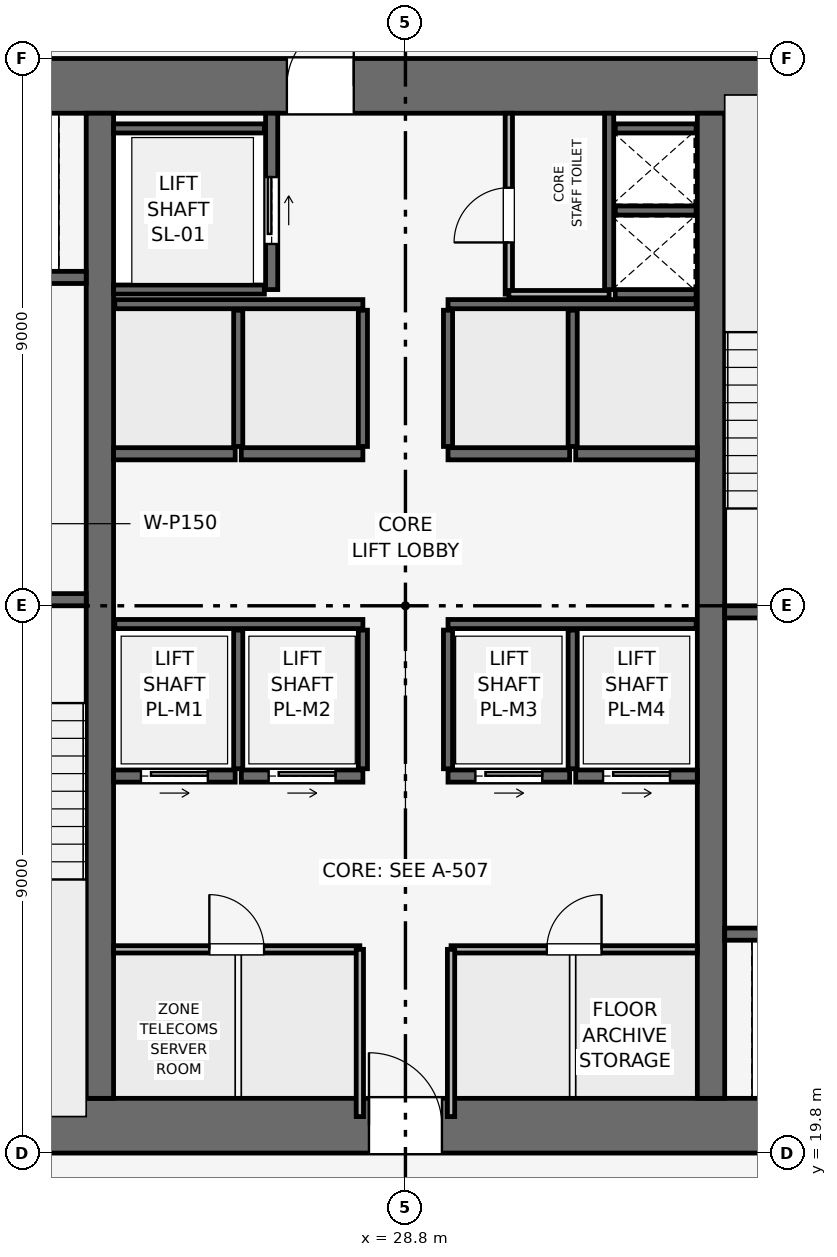
"""IFC4 building model, lengths in metres.
Left out: names, types, materials, properties, quantities, classifications, styles, units other than length and angle.
Written with IfcOpenShell. Run it as: python <this file> out.ifc"""

import sys

from ifc_helpers import new_model, si_unit, direction, frame, frame_2d, origin, place, context, subcontext, project, spatial, rectangle, extrude, element, fill, save


model = new_model("IFC4")
c1 = context("Model", 3, precision=1e-05, world=origin(), true_north=direction((0.0, 1.0)))
c2 = subcontext(c1, "Body", "Model", "MODEL_VIEW")
j1 = project(units=[si_unit("LENGTHUNIT", "METRE"), si_unit("PLANEANGLEUNIT", "RADIAN")], contexts=[c1])
p1 = place(None, origin())
s1 = spatial("IfcSite", under=j1, at=p1, CompositionType="ELEMENT")
p2 = place(p1, origin())
s2 = spatial("IfcBuilding", under=s1, at=p2, CompositionType="ELEMENT")
p3 = place(p2, frame((0.0, 0.0, 149.55)))
s3 = spatial("IfcBuildingStorey", under=s2, at=p3, CompositionType="ELEMENT", Elevation=149.55)
p4 = place(p3, frame((19.8, 20.25, 0.0), z_axis=(0.0, 0.0, 1.0), x_axis=(1.0, 0.0, 0.0)))
e1 = element("IfcWall", 1, at=p4, inside=s3, PredefinedType="SHEAR", context=c2, shape_type="SweptSolid", body=[
    extrude(rectangle(XDim=18.0, YDim=0.9, at=frame_2d((9.0, 0.0))), origin(), (0.0, 0.0, 1.0), 3.75),
])
p5 = place(p4, frame((8.4, 0.0, 0.0)))
e2 = element("IfcOpeningElement", 2, at=p5, cuts=e1, PredefinedType="OPENING", context=c2, shape_type="SweptSolid", body=[
    extrude(rectangle(XDim=1.2, YDim=2.2, at=frame_2d((0.6, 1.1))), frame((0.0, 0.46, 0.0), z_axis=(0.0, -1.0, 0.0), x_axis=(1.0, 0.0, 0.0)), (0.0, 0.0, 1.0), 0.92),
])
p6 = place(p3, frame((19.8, 37.35, 0.0), z_axis=(0.0, 0.0, 1.0), x_axis=(1.0, 0.0, 0.0)))
e3 = element("IfcWall", 3, at=p6, inside=s3, PredefinedType="SHEAR", context=c2, shape_type="SweptSolid", body=[
    extrude(rectangle(XDim=18.0, YDim=0.9, at=frame_2d((9.0, 0.0))), origin(), (0.0, 0.0, 1.0), 3.75),
])
p7 = place(p6, frame((7.05, 0.0, 0.0)))
e4 = element("IfcOpeningElement", 4, at=p7, cuts=e3, PredefinedType="OPENING", context=c2, shape_type="SweptSolid", body=[
    extrude(rectangle(XDim=1.1, YDim=2.15, at=frame_2d((0.55, 1.075))), frame((0.0, 0.46, 0.0), z_axis=(0.0, -1.0, 0.0), x_axis=(1.0, 0.0, 0.0)), (0.0, 0.0, 1.0), 0.92),
])
for number, where, z_axis, x_axis in (
    (5, (23.775, 20.7, 0.0), (0.0, 0.0, 1.0), (0.0, 1.0, 0.0)),
    (6, (33.825, 20.7, 0.0), (0.0, 0.0, 1.0), (0.0, 1.0, 0.0)),
):
    element("IfcWall", number, at=place(p3, frame(where, z_axis=z_axis, x_axis=x_axis)), inside=s3, PredefinedType="SHEAR", context=c2, shape_type="SweptSolid", body=[
        extrude(rectangle(XDim=16.2, YDim=0.45, at=frame_2d((8.1, 0.0))), origin(), (0.0, 0.0, 1.0), 3.75),
    ])
p8 = place(p3, frame((20.4, 28.9, 0.0), z_axis=(0.0, 0.0, 1.0), x_axis=(1.0, 0.0, 0.0)))
e7 = element("IfcWall", 7, at=p8, inside=s3, PredefinedType="SHEAR", context=c2, shape_type="SweptSolid", body=[
    extrude(rectangle(XDim=3.15, YDim=0.2, at=frame_2d((1.575, 0.0))), origin(), (0.0, 0.0, 1.0), 3.495),
])
p9 = place(p8, frame((0.8, 0.0, 0.0)))
e8 = element("IfcOpeningElement", 8, at=p9, cuts=e7, PredefinedType="OPENING", context=c2, shape_type="SweptSolid", body=[
    extrude(rectangle(XDim=1.0, YDim=2.1, at=frame_2d((0.5, 1.05))), frame((0.0, 0.11, 0.0), z_axis=(0.0, -1.0, 0.0), x_axis=(1.0, 0.0, 0.0)), (0.0, 0.0, 1.0), 0.22),
])
p10 = place(p3, frame((34.05, 28.7, 0.0), z_axis=(0.0, 0.0, 1.0), x_axis=(1.0, 0.0, 0.0)))
e9 = element("IfcWall", 9, at=p10, inside=s3, PredefinedType="SHEAR", context=c2, shape_type="SweptSolid", body=[
    extrude(rectangle(XDim=3.15, YDim=0.2, at=frame_2d((1.575, 0.0))), origin(), (0.0, 0.0, 1.0), 3.495),
])
p11 = place(p10, frame((0.8, 0.0, 0.0)))
e10 = element("IfcOpeningElement", 10, at=p11, cuts=e9, PredefinedType="OPENING", context=c2, shape_type="SweptSolid", body=[
    extrude(rectangle(XDim=1.0, YDim=2.1, at=frame_2d((0.5, 1.05))), frame((0.0, 0.11, 0.0), z_axis=(0.0, -1.0, 0.0), x_axis=(1.0, 0.0, 0.0)), (0.0, 0.0, 1.0), 0.22),
])
p12 = place(p3, frame((32.15, 34.0, 0.0), z_axis=(0.0, 0.0, 1.0), x_axis=(0.0, 1.0, 0.0)))
e11 = element("IfcWall", 11, at=p12, inside=s3, PredefinedType="SHEAR", context=c2, shape_type="SweptSolid", body=[
    extrude(rectangle(XDim=2.9, YDim=0.15, at=frame_2d((1.45, 0.0))), origin(), (0.0, 0.0, 1.0), 3.495),
])
for number, where, z_axis, x_axis in (
    (12, (32.25, 33.925, 0.0), (0.0, 0.0, 1.0), (1.0, 0.0, 0.0)),
    (13, (32.25, 35.3, 0.0), (0.0, 0.0, 1.0), (1.0, 0.0, 0.0)),
):
    element("IfcWall", number, at=place(p3, frame(where, z_axis=z_axis, x_axis=x_axis)), inside=s3, PredefinedType="SHEAR", context=c2, shape_type="SweptSolid", body=[
        extrude(rectangle(XDim=1.33, YDim=0.15, at=frame_2d((0.665, 0.0))), origin(), (0.0, 0.0, 1.0), 3.495),
    ])
p13 = place(p3, frame((20.5, 34.2, 0.0), z_axis=(0.0, 0.0, 1.0), x_axis=(1.0, 0.0, 0.0)))
e14 = element("IfcWall", 14, at=p13, inside=s3, PredefinedType="SHEAR", context=c2, shape_type="SweptSolid", body=[
    extrude(rectangle(XDim=3.05, YDim=0.2, at=frame_2d((1.525, 0.0))), origin(), (0.0, 0.0, 1.0), 3.495),
])
p14 = place(p13, frame((0.75, 0.0, 0.0)))
e15 = element("IfcOpeningElement", 15, at=p14, cuts=e14, PredefinedType="OPENING", context=c2, shape_type="SweptSolid", body=[
    extrude(rectangle(XDim=1.1, YDim=2.15, at=frame_2d((0.55, 1.075))), frame((0.0, 0.11, 0.0), z_axis=(0.0, -1.0, 0.0), x_axis=(1.0, 0.0, 0.0)), (0.0, 0.0, 1.0), 0.22),
])
p15 = place(p3, frame((34.05, 23.4, 0.0), z_axis=(0.0, 0.0, 1.0), x_axis=(1.0, 0.0, 0.0)))
e16 = element("IfcWall", 16, at=p15, inside=s3, PredefinedType="SHEAR", context=c2, shape_type="SweptSolid", body=[
    extrude(rectangle(XDim=3.05, YDim=0.2, at=frame_2d((1.525, 0.0))), origin(), (0.0, 0.0, 1.0), 3.495),
])
p16 = place(p15, frame((1.2, 0.0, 0.0)))
e17 = element("IfcOpeningElement", 17, at=p16, cuts=e16, PredefinedType="OPENING", context=c2, shape_type="SweptSolid", body=[
    extrude(rectangle(XDim=1.1, YDim=2.15, at=frame_2d((0.55, 1.075))), frame((0.0, 0.11, 0.0), z_axis=(0.0, -1.0, 0.0), x_axis=(1.0, 0.0, 0.0)), (0.0, 0.0, 1.0), 0.22),
])
p17 = place(p3, frame((26.6, 34.0, 0.0), z_axis=(0.0, 0.0, 1.0), x_axis=(0.0, 1.0, 0.0)))
e18 = element("IfcWall", 18, at=p17, inside=s3, PredefinedType="SHEAR", context=c2, shape_type="SweptSolid", body=[
    extrude(rectangle(XDim=2.9, YDim=0.2, at=frame_2d((1.45, 0.0))), origin(), (0.0, 0.0, 1.0), 3.495),
])
p18 = place(p17, frame((0.75, 0.0, 0.0)))
e19 = element("IfcOpeningElement", 19, at=p18, cuts=e18, PredefinedType="OPENING", context=c2, shape_type="SweptSolid", body=[
    extrude(rectangle(XDim=1.1, YDim=2.15, at=frame_2d((0.55, 1.075))), frame((0.0, 0.11, 0.0), z_axis=(0.0, -1.0, 0.0), x_axis=(1.0, 0.0, 0.0)), (0.0, 0.0, 1.0), 0.22),
])
for number, where, z_axis, x_axis in (
    (20, (24.0, 34.0, 0.0), (0.0, 0.0, 1.0), (1.0, 0.0, 0.0)),
    (21, (24.0, 36.65, 0.0), (0.0, 0.0, 1.0), (1.0, 0.0, 0.0)),
):
    element("IfcWall", number, at=place(p3, frame(where, z_axis=z_axis, x_axis=x_axis)), inside=s3, PredefinedType="SHEAR", context=c2, shape_type="SweptSolid", body=[
        extrude(rectangle(XDim=2.48, YDim=0.15, at=frame_2d((1.24, 0.0))), origin(), (0.0, 0.0, 1.0), 3.495),
    ])
p19 = place(p3, frame((24.0, 26.0, 0.0), z_axis=(0.0, 0.0, 1.0), x_axis=(1.0, 0.0, 0.0)))
e22 = element("IfcWall", 22, at=p19, inside=s3, PredefinedType="SHEAR", context=c2, shape_type="SweptSolid", body=[
    extrude(rectangle(XDim=2.0, YDim=0.2, at=frame_2d((1.0, 0.0))), origin(), (0.0, 0.0, 1.0), 3.495),
])
p20 = place(p19, frame((0.45, 0.0, 0.0)))
e23 = element("IfcOpeningElement", 23, at=p20, cuts=e22, PredefinedType="OPENING", context=c2, shape_type="SweptSolid", body=[
    extrude(rectangle(XDim=1.1, YDim=2.15, at=frame_2d((0.55, 1.075))), frame((0.0, 0.11, 0.0), z_axis=(0.0, -1.0, 0.0), x_axis=(1.0, 0.0, 0.0)), (0.0, 0.0, 1.0), 0.22),
])
p21 = place(p3, frame((26.1, 26.0, 0.0), z_axis=(0.0, 0.0, 1.0), x_axis=(1.0, 0.0, 0.0)))
e24 = element("IfcWall", 24, at=p21, inside=s3, PredefinedType="SHEAR", context=c2, shape_type="SweptSolid", body=[
    extrude(rectangle(XDim=2.0, YDim=0.2, at=frame_2d((1.0, 0.0))), origin(), (0.0, 0.0, 1.0), 3.495),
])
p22 = place(p21, frame((0.45, 0.0, 0.0)))
e25 = element("IfcOpeningElement", 25, at=p22, cuts=e24, PredefinedType="OPENING", context=c2, shape_type="SweptSolid", body=[
    extrude(rectangle(XDim=1.1, YDim=2.15, at=frame_2d((0.55, 1.075))), frame((0.0, 0.11, 0.0), z_axis=(0.0, -1.0, 0.0), x_axis=(1.0, 0.0, 0.0)), (0.0, 0.0, 1.0), 0.22),
])
p23 = place(p3, frame((29.5, 26.0, 0.0), z_axis=(0.0, 0.0, 1.0), x_axis=(1.0, 0.0, 0.0)))
e26 = element("IfcWall", 26, at=p23, inside=s3, PredefinedType="SHEAR", context=c2, shape_type="SweptSolid", body=[
    extrude(rectangle(XDim=2.0, YDim=0.2, at=frame_2d((1.0, 0.0))), origin(), (0.0, 0.0, 1.0), 3.495),
])
p24 = place(p23, frame((0.45, 0.0, 0.0)))
e27 = element("IfcOpeningElement", 27, at=p24, cuts=e26, PredefinedType="OPENING", context=c2, shape_type="SweptSolid", body=[
    extrude(rectangle(XDim=1.1, YDim=2.15, at=frame_2d((0.55, 1.075))), frame((0.0, 0.11, 0.0), z_axis=(0.0, -1.0, 0.0), x_axis=(1.0, 0.0, 0.0)), (0.0, 0.0, 1.0), 0.22),
])
p25 = place(p3, frame((31.6, 26.0, 0.0), z_axis=(0.0, 0.0, 1.0), x_axis=(1.0, 0.0, 0.0)))
e28 = element("IfcWall", 28, at=p25, inside=s3, PredefinedType="SHEAR", context=c2, shape_type="SweptSolid", body=[
    extrude(rectangle(XDim=2.0, YDim=0.2, at=frame_2d((1.0, 0.0))), origin(), (0.0, 0.0, 1.0), 3.495),
])
p26 = place(p25, frame((0.45, 0.0, 0.0)))
e29 = element("IfcOpeningElement", 29, at=p26, cuts=e28, PredefinedType="OPENING", context=c2, shape_type="SweptSolid", body=[
    extrude(rectangle(XDim=1.1, YDim=2.15, at=frame_2d((0.55, 1.075))), frame((0.0, 0.11, 0.0), z_axis=(0.0, -1.0, 0.0), x_axis=(1.0, 0.0, 0.0)), (0.0, 0.0, 1.0), 0.22),
])
for number, where, z_axis, x_axis in (
    (30, (24.0, 31.3, 0.0), (0.0, 0.0, 1.0), (1.0, 0.0, 0.0)),
    (31, (26.1, 31.3, 0.0), (0.0, 0.0, 1.0), (1.0, 0.0, 0.0)),
    (32, (29.5, 31.3, 0.0), (0.0, 0.0, 1.0), (1.0, 0.0, 0.0)),
    (33, (31.6, 31.3, 0.0), (0.0, 0.0, 1.0), (1.0, 0.0, 0.0)),
):
    element("IfcWall", number, at=place(p3, frame(where, z_axis=z_axis, x_axis=x_axis)), inside=s3, PredefinedType="SHEAR", context=c2, shape_type="SweptSolid", body=[
        extrude(rectangle(XDim=2.0, YDim=0.2, at=frame_2d((1.0, 0.0))), origin(), (0.0, 0.0, 1.0), 3.495),
    ])
p27 = place(p3, frame((32.25, 36.65, 0.0), z_axis=(0.0, 0.0, 1.0), x_axis=(1.0, 0.0, 0.0)))
e34 = element("IfcWall", 34, at=p27, inside=s3, PredefinedType="SHEAR", context=c2, shape_type="SweptSolid", body=[
    extrude(rectangle(XDim=1.33, YDim=0.15, at=frame_2d((0.665, 0.0))), origin(), (0.0, 0.0, 1.0), 3.495),
])
for number, where, z_axis, x_axis in (
    (35, (24.02, 28.5, 0.0), (0.0, 0.0, 1.0), (1.0, 0.0, 0.0)),
    (36, (29.5, 28.5, 0.0), (0.0, 0.0, 1.0), (1.0, 0.0, 0.0)),
):
    element("IfcWall", number, at=place(p3, frame(where, z_axis=z_axis, x_axis=x_axis)), inside=s3, PredefinedType="SHEAR", context=c2, shape_type="SweptSolid", body=[
        extrude(rectangle(XDim=4.08, YDim=0.15, at=frame_2d((2.04, 0.0))), origin(), (0.0, 0.0, 1.0), 3.495),
    ])
for number, where, z_axis, x_axis in (
    (37, (26.05, 26.12, 0.0), (0.0, 0.0, 1.0), (0.0, 1.0, 0.0)),
    (38, (28.1, 26.12, 0.0), (0.0, 0.0, 1.0), (0.0, 1.0, 0.0)),
    (39, (29.5, 26.12, 0.0), (0.0, 0.0, 1.0), (0.0, 1.0, 0.0)),
    (40, (31.55, 26.12, 0.0), (0.0, 0.0, 1.0), (0.0, 1.0, 0.0)),
):
    element("IfcWall", number, at=place(p3, frame(where, z_axis=z_axis, x_axis=x_axis)), inside=s3, PredefinedType="SHEAR", context=c2, shape_type="SweptSolid", body=[
        extrude(rectangle(XDim=2.28, YDim=0.15, at=frame_2d((1.14, 0.0))), origin(), (0.0, 0.0, 1.0), 3.495),
    ])
for number, where, z_axis, x_axis in (
    (41, (24.02, 33.76, 0.0), (0.0, 0.0, 1.0), (1.0, 0.0, 0.0)),
    (42, (29.5, 33.76, 0.0), (0.0, 0.0, 1.0), (1.0, 0.0, 0.0)),
):
    element("IfcWall", number, at=place(p3, frame(where, z_axis=z_axis, x_axis=x_axis)), inside=s3, PredefinedType="SHEAR", context=c2, shape_type="SweptSolid", body=[
        extrude(rectangle(XDim=4.08, YDim=0.15, at=frame_2d((2.04, 0.0))), origin(), (0.0, 0.0, 1.0), 3.495),
    ])
for number, where, z_axis, x_axis in (
    (43, (26.05, 31.42, 0.0), (0.0, 0.0, 1.0), (0.0, 1.0, 0.0)),
    (44, (28.1, 31.42, 0.0), (0.0, 0.0, 1.0), (0.0, 1.0, 0.0)),
    (45, (29.5, 31.42, 0.0), (0.0, 0.0, 1.0), (0.0, 1.0, 0.0)),
    (46, (31.55, 31.42, 0.0), (0.0, 0.0, 1.0), (0.0, 1.0, 0.0)),
):
    element("IfcWall", number, at=place(p3, frame(where, z_axis=z_axis, x_axis=x_axis)), inside=s3, PredefinedType="SHEAR", context=c2, shape_type="SweptSolid", body=[
        extrude(rectangle(XDim=2.24, YDim=0.15, at=frame_2d((1.12, 0.0))), origin(), (0.0, 0.0, 1.0), 3.495),
    ])
p28 = place(p3, frame((30.5, 33.925, 0.0), z_axis=(0.0, 0.0, 1.0), x_axis=(0.0, 1.0, 0.0)))
e47 = element("IfcWall", 47, at=p28, inside=s3, PredefinedType="PARTITIONING", context=c2, shape_type="SweptSolid", body=[
    extrude(rectangle(XDim=2.975, YDim=0.12, at=frame_2d((1.487, 0.0))), origin(), (0.0, 0.0, 1.0), 3.495),
])
p29 = place(p28, frame((0.85, 0.0, 0.0)))
e48 = element("IfcOpeningElement", 48, at=p29, cuts=e47, PredefinedType="OPENING", context=c2, shape_type="SweptSolid", body=[
    extrude(rectangle(XDim=0.9, YDim=2.1, at=frame_2d((0.45, 1.05))), frame((0.0, 0.07, 0.0), z_axis=(0.0, -1.0, 0.0), x_axis=(1.0, 0.0, 0.0)), (0.0, 0.0, 1.0), 0.14),
])
p30 = place(p3, frame((30.5, 33.925, 0.0), z_axis=(0.0, 0.0, 1.0), x_axis=(1.0, 0.0, 0.0)))
e49 = element("IfcWall", 49, at=p30, inside=s3, PredefinedType="PARTITIONING", context=c2, shape_type="SweptSolid", body=[
    extrude(rectangle(XDim=1.65, YDim=0.12, at=frame_2d((0.825, 0.0))), origin(), (0.0, 0.0, 1.0), 3.495),
])
p31 = place(p3, frame((24.0, 23.15, 0.0), z_axis=(0.0, 0.0, 1.0), x_axis=(1.0, 0.0, 0.0)))
e50 = element("IfcWall", 50, at=p31, inside=s3, PredefinedType="PARTITIONING", context=c2, shape_type="SweptSolid", body=[
    extrude(rectangle(XDim=4.05, YDim=0.12, at=frame_2d((2.025, 0.0))), origin(), (0.0, 0.0, 1.0), 3.495),
])
p32 = place(p31, frame((1.575, 0.0, 0.0)))
e51 = element("IfcOpeningElement", 51, at=p32, cuts=e50, PredefinedType="OPENING", context=c2, shape_type="SweptSolid", body=[
    extrude(rectangle(XDim=0.9, YDim=2.1, at=frame_2d((0.45, 1.05))), frame((0.0, 0.07, 0.0), z_axis=(0.0, -1.0, 0.0), x_axis=(1.0, 0.0, 0.0)), (0.0, 0.0, 1.0), 0.14),
])
p33 = place(p3, frame((28.05, 20.4, 0.0), z_axis=(0.0, 0.0, 1.0), x_axis=(0.0, 1.0, 0.0)))
e52 = element("IfcWall", 52, at=p33, inside=s3, PredefinedType="PARTITIONING", context=c2, shape_type="SweptSolid", body=[
    extrude(rectangle(XDim=2.75, YDim=0.12, at=frame_2d((1.375, 0.0))), origin(), (0.0, 0.0, 1.0), 3.495),
])
p34 = place(p3, frame((29.55, 23.15, 0.0), z_axis=(0.0, 0.0, 1.0), x_axis=(1.0, 0.0, 0.0)))
e53 = element("IfcWall", 53, at=p34, inside=s3, PredefinedType="PARTITIONING", context=c2, shape_type="SweptSolid", body=[
    extrude(rectangle(XDim=4.05, YDim=0.12, at=frame_2d((2.025, 0.0))), origin(), (0.0, 0.0, 1.0), 3.495),
])
p35 = place(p34, frame((1.575, 0.0, 0.0)))
e54 = element("IfcOpeningElement", 54, at=p35, cuts=e53, PredefinedType="OPENING", context=c2, shape_type="SweptSolid", body=[
    extrude(rectangle(XDim=0.9, YDim=2.1, at=frame_2d((0.45, 1.05))), frame((0.0, 0.07, 0.0), z_axis=(0.0, -1.0, 0.0), x_axis=(1.0, 0.0, 0.0)), (0.0, 0.0, 1.0), 0.14),
])
p36 = place(p3, frame((29.55, 20.4, 0.0), z_axis=(0.0, 0.0, 1.0), x_axis=(0.0, 1.0, 0.0)))
e55 = element("IfcWall", 55, at=p36, inside=s3, PredefinedType="PARTITIONING", context=c2, shape_type="SweptSolid", body=[
    extrude(rectangle(XDim=2.75, YDim=0.12, at=frame_2d((1.375, 0.0))), origin(), (0.0, 0.0, 1.0), 3.495),
])
p37 = place(p18, origin())
e56 = element("IfcDoor", 56, at=p37, inside=s3, OperationType="SLIDING_TO_RIGHT", PredefinedType="DOOR", context=c2, shape_type="SweptSolid", body=[
    extrude(rectangle(XDim=1.1, YDim=2.15, at=frame_2d((0.55, 1.075))), frame((0.0, 0.025, 0.0), z_axis=(0.0, -1.0, 0.0), x_axis=(1.0, 0.0, 0.0)), (0.0, 0.0, 1.0), 0.05),
])
fill(e19, e56)
p38 = place(p20, origin())
e57 = element("IfcDoor", 57, at=p38, inside=s3, OperationType="SLIDING_TO_RIGHT", PredefinedType="DOOR", context=c2, shape_type="SweptSolid", body=[
    extrude(rectangle(XDim=1.1, YDim=2.15, at=frame_2d((0.55, 1.075))), frame((0.0, 0.025, 0.0), z_axis=(0.0, -1.0, 0.0), x_axis=(1.0, 0.0, 0.0)), (0.0, 0.0, 1.0), 0.05),
])
fill(e23, e57)
p39 = place(p22, origin())
e58 = element("IfcDoor", 58, at=p39, inside=s3, OperationType="SLIDING_TO_RIGHT", PredefinedType="DOOR", context=c2, shape_type="SweptSolid", body=[
    extrude(rectangle(XDim=1.1, YDim=2.15, at=frame_2d((0.55, 1.075))), frame((0.0, 0.025, 0.0), z_axis=(0.0, -1.0, 0.0), x_axis=(1.0, 0.0, 0.0)), (0.0, 0.0, 1.0), 0.05),
])
fill(e25, e58)
p40 = place(p24, origin())
e59 = element("IfcDoor", 59, at=p40, inside=s3, OperationType="SLIDING_TO_RIGHT", PredefinedType="DOOR", context=c2, shape_type="SweptSolid", body=[
    extrude(rectangle(XDim=1.1, YDim=2.15, at=frame_2d((0.55, 1.075))), frame((0.0, 0.025, 0.0), z_axis=(0.0, -1.0, 0.0), x_axis=(1.0, 0.0, 0.0)), (0.0, 0.0, 1.0), 0.05),
])
fill(e27, e59)
p41 = place(p26, origin())
e60 = element("IfcDoor", 60, at=p41, inside=s3, OperationType="SLIDING_TO_RIGHT", PredefinedType="DOOR", context=c2, shape_type="SweptSolid", body=[
    extrude(rectangle(XDim=1.1, YDim=2.15, at=frame_2d((0.55, 1.075))), frame((0.0, 0.025, 0.0), z_axis=(0.0, -1.0, 0.0), x_axis=(1.0, 0.0, 0.0)), (0.0, 0.0, 1.0), 0.05),
])
fill(e29, e60)
p42 = place(p29, origin())
e61 = element("IfcDoor", 61, at=p42, inside=s3, OperationType="SINGLE_SWING_LEFT", PredefinedType="DOOR", context=c2, shape_type="SweptSolid", body=[
    extrude(rectangle(XDim=0.9, YDim=2.1, at=frame_2d((0.45, 1.05))), frame((0.0, 0.025, 0.0), z_axis=(0.0, -1.0, 0.0), x_axis=(1.0, 0.0, 0.0)), (0.0, 0.0, 1.0), 0.05),
])
fill(e48, e61)
p43 = place(p32, origin())
e62 = element("IfcDoor", 62, at=p43, inside=s3, OperationType="SINGLE_SWING_LEFT", PredefinedType="DOOR", context=c2, shape_type="SweptSolid", body=[
    extrude(rectangle(XDim=0.9, YDim=2.1, at=frame_2d((0.45, 1.05))), frame((0.0, 0.025, 0.0), z_axis=(0.0, -1.0, 0.0), x_axis=(1.0, 0.0, 0.0)), (0.0, 0.0, 1.0), 0.05),
])
fill(e51, e62)
p44 = place(p35, origin())
e63 = element("IfcDoor", 63, at=p44, inside=s3, OperationType="SINGLE_SWING_RIGHT", PredefinedType="DOOR", context=c2, shape_type="SweptSolid", body=[
    extrude(rectangle(XDim=0.9, YDim=2.1, at=frame_2d((0.45, 1.05))), frame((0.0, 0.025, 0.0), z_axis=(0.0, -1.0, 0.0), x_axis=(1.0, 0.0, 0.0)), (0.0, 0.0, 1.0), 0.05),
])
fill(e54, e63)
p45 = place(p5, origin())
e64 = element("IfcDoor", 64, at=p45, inside=s3, OperationType="SINGLE_SWING_LEFT", PredefinedType="DOOR", context=c2, shape_type="SweptSolid", body=[
    extrude(rectangle(XDim=1.2, YDim=2.2, at=frame_2d((0.6, 1.1))), frame((0.0, 0.025, 0.0), z_axis=(0.0, -1.0, 0.0), x_axis=(1.0, 0.0, 0.0)), (0.0, 0.0, 1.0), 0.05),
])
fill(e2, e64)
p46 = place(p7, origin())
e65 = element("IfcDoor", 65, at=p46, inside=s3, OperationType="SINGLE_SWING_RIGHT", PredefinedType="DOOR", context=c2, shape_type="SweptSolid", body=[
    extrude(rectangle(XDim=1.1, YDim=2.15, at=frame_2d((0.55, 1.075))), frame((0.0, 0.025, 0.0), z_axis=(0.0, -1.0, 0.0), x_axis=(1.0, 0.0, 0.0)), (0.0, 0.0, 1.0), 0.05),
])
fill(e4, e65)
save(model, sys.argv[1])
